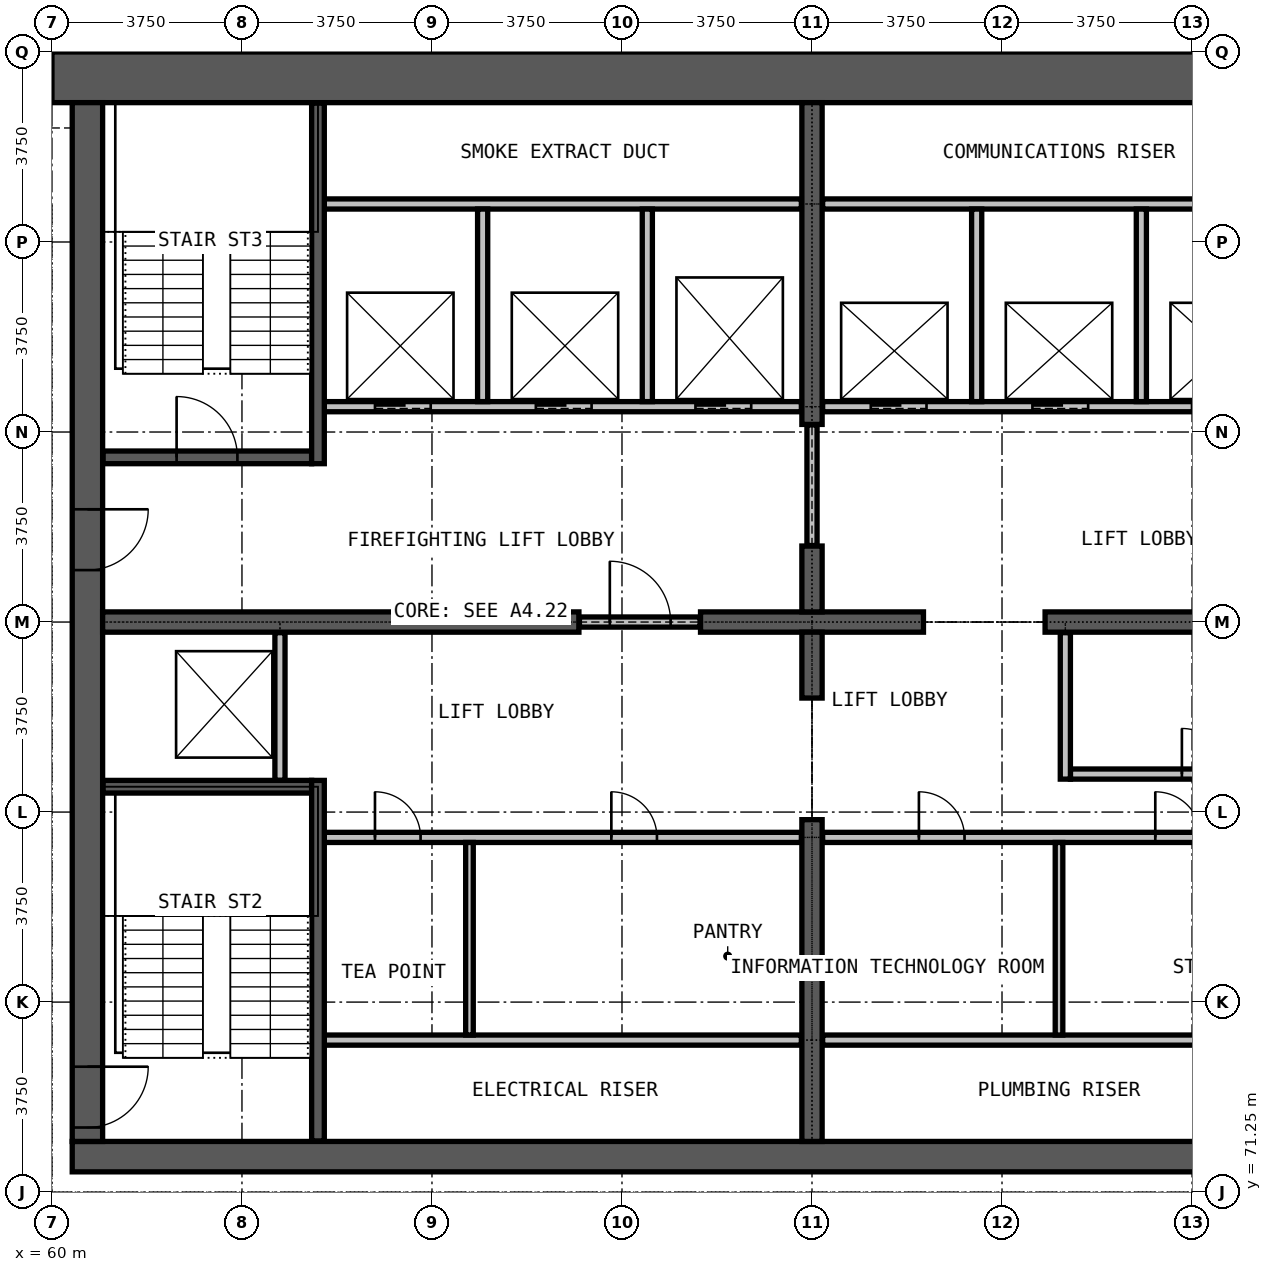
"""IFC4 building model, lengths in metres.
Left out: names, types, materials, properties, quantities, classifications, styles, units other than length and angle.
Written with IfcOpenShell. Run it as: python <this file> out.ifc"""

import sys

from ifc_helpers import new_model, si_unit, direction, frame, frame_2d, origin, place, context, subcontext, project, spatial, rectangle, extrude, element, fill, save


model = new_model("IFC4")
c1 = context("Model", 3, precision=1e-05, world=origin(), true_north=direction((0.0, 1.0)))
c2 = subcontext(c1, "Body", "Model", "MODEL_VIEW")
j1 = project(units=[si_unit("LENGTHUNIT", "METRE"), si_unit("PLANEANGLEUNIT", "RADIAN")], contexts=[c1])
p1 = place(None, origin())
s1 = spatial("IfcSite", under=j1, at=p1, CompositionType="ELEMENT")
p2 = place(p1, origin())
s2 = spatial("IfcBuilding", under=s1, at=p2, CompositionType="ELEMENT")
p3 = place(p2, frame((0.0, 0.0, 199.5)))
s3 = spatial("IfcBuildingStorey", under=s2, at=p3, CompositionType="ELEMENT", Elevation=199.5)
p4 = place(p3, frame((60.4, 71.95, 0.0), z_axis=(0.0, 0.0, 1.0), x_axis=(1.0, 0.0, 0.0)))
e1 = element("IfcWall", 1, at=p4, inside=s3, PredefinedType="SHEAR", context=c2, shape_type="SweptSolid", body=[
    extrude(rectangle(XDim=29.2, YDim=0.6, at=frame_2d((14.6, 0.0))), origin(), (0.0, 0.0, 1.0), 3.6),
])
p5 = place(p3, frame((90.0, 93.25, 0.0), z_axis=(0.0, 0.0, 1.0), x_axis=(-1.0, 0.0, 0.0)))
e2 = element("IfcWall", 2, at=p5, inside=s3, PredefinedType="SHEAR", context=c2, shape_type="SweptSolid", body=[
    extrude(rectangle(XDim=30.0, YDim=1.0, at=frame_2d((15.0, 0.0))), origin(), (0.0, 0.0, 1.0), 3.6),
])
p6 = place(p3, frame((60.7, 92.75, 0.0), z_axis=(0.0, 0.0, 1.0), x_axis=(0.0, -1.0, 0.0)))
e3 = element("IfcWall", 3, at=p6, inside=s3, PredefinedType="SHEAR", context=c2, shape_type="SweptSolid", body=[
    extrude(rectangle(XDim=20.5, YDim=0.6, at=frame_2d((10.25, 0.0))), origin(), (0.0, 0.0, 1.0), 3.6),
])
p7 = place(p6, frame((19.025, 0.0, 0.0)))
e4 = element("IfcOpeningElement", 4, at=p7, cuts=e3, PredefinedType="OPENING", context=c2, shape_type="SweptSolid", body=[
    extrude(rectangle(XDim=1.2, YDim=2.2, at=frame_2d((0.6, 1.1))), frame((0.0, 0.31, 0.0), z_axis=(0.0, -1.0, 0.0), x_axis=(1.0, 0.0, 0.0)), (0.0, 0.0, 1.0), 0.62),
])
p8 = place(p6, frame((8.025, 0.0, 0.0)))
e5 = element("IfcOpeningElement", 5, at=p8, cuts=e3, PredefinedType="OPENING", context=c2, shape_type="SweptSolid", body=[
    extrude(rectangle(XDim=1.2, YDim=2.2, at=frame_2d((0.6, 1.1))), frame((0.0, 0.31, 0.0), z_axis=(0.0, -1.0, 0.0), x_axis=(1.0, 0.0, 0.0)), (0.0, 0.0, 1.0), 0.62),
])
p9 = place(p3, frame((61.0, 82.5, 0.0), z_axis=(0.0, 0.0, 1.0), x_axis=(1.0, 0.0, 0.0)))
e6 = element("IfcWall", 6, at=p9, inside=s3, PredefinedType="SHEAR", context=c2, shape_type="SweptSolid", body=[
    extrude(rectangle(XDim=9.4, YDim=0.4, at=frame_2d((4.7, 0.0))), origin(), (0.0, 0.0, 1.0), 3.6),
])
p10 = place(p3, frame((72.8, 82.5, 0.0), z_axis=(0.0, 0.0, 1.0), x_axis=(1.0, 0.0, 0.0)))
e7 = element("IfcWall", 7, at=p10, inside=s3, PredefinedType="SHEAR", context=c2, shape_type="SweptSolid", body=[
    extrude(rectangle(XDim=4.4, YDim=0.4, at=frame_2d((2.2, 0.0))), origin(), (0.0, 0.0, 1.0), 3.6),
])
p11 = place(p3, frame((79.6, 82.5, 0.0), z_axis=(0.0, 0.0, 1.0), x_axis=(1.0, 0.0, 0.0)))
e8 = element("IfcWall", 8, at=p11, inside=s3, PredefinedType="SHEAR", context=c2, shape_type="SweptSolid", body=[
    extrude(rectangle(XDim=9.4, YDim=0.4, at=frame_2d((4.7, 0.0))), origin(), (0.0, 0.0, 1.0), 3.6),
])
p12 = place(p3, frame((75.0, 72.25, 0.0), z_axis=(0.0, 0.0, 1.0), x_axis=(0.0, 1.0, 0.0)))
e9 = element("IfcWall", 9, at=p12, inside=s3, PredefinedType="SHEAR", context=c2, shape_type="SweptSolid", body=[
    extrude(rectangle(XDim=6.35, YDim=0.4, at=frame_2d((3.175, 0.0))), origin(), (0.0, 0.0, 1.0), 3.6),
])
for number, where, z_axis, x_axis in (
    (10, (75.0, 81.0, 0.0), (0.0, 0.0, 1.0), (0.0, 1.0, 0.0)),
    (11, (75.0, 82.7, 0.0), (0.0, 0.0, 1.0), (0.0, 1.0, 0.0)),
):
    element("IfcWall", number, at=place(p3, frame(where, z_axis=z_axis, x_axis=x_axis)), inside=s3, PredefinedType="SHEAR", context=c2, shape_type="SweptSolid", body=[
        extrude(rectangle(XDim=1.3, YDim=0.4, at=frame_2d((0.65, 0.0))), origin(), (0.0, 0.0, 1.0), 3.6),
    ])
p13 = place(p3, frame((75.0, 86.4, 0.0), z_axis=(0.0, 0.0, 1.0), x_axis=(0.0, 1.0, 0.0)))
e12 = element("IfcWall", 12, at=p13, inside=s3, PredefinedType="SHEAR", context=c2, shape_type="SweptSolid", body=[
    extrude(rectangle(XDim=6.35, YDim=0.4, at=frame_2d((3.175, 0.0))), origin(), (0.0, 0.0, 1.0), 3.6),
])
for number, where, z_axis, x_axis in (
    (13, (65.375, 74.25, 0.0), (0.0, 0.0, 1.0), (1.0, 0.0, 0.0)),
    (14, (75.21, 74.25, 0.0), (0.0, 0.0, 1.0), (1.0, 0.0, 0.0)),
):
    element("IfcWall", number, at=place(p3, frame(where, z_axis=z_axis, x_axis=x_axis)), inside=s3, PredefinedType="PARTITIONING", context=c2, shape_type="SweptSolid", body=[
        extrude(rectangle(XDim=9.415, YDim=0.2, at=frame_2d((4.708, 0.0))), origin(), (0.0, 0.0, 1.0), 3.3),
    ])
p14 = place(p3, frame((65.375, 78.25, 0.0), z_axis=(0.0, 0.0, 1.0), x_axis=(1.0, 0.0, 0.0)))
e15 = element("IfcWall", 15, at=p14, inside=s3, PredefinedType="PARTITIONING", context=c2, shape_type="SweptSolid", body=[
    extrude(rectangle(XDim=9.415, YDim=0.2, at=frame_2d((4.708, 0.0))), origin(), (0.0, 0.0, 1.0), 3.3),
])
p15 = place(p14, frame((1.0, 0.0, 0.0)))
e16 = element("IfcOpeningElement", 16, at=p15, cuts=e15, PredefinedType="OPENING", context=c2, shape_type="SweptSolid", body=[
    extrude(rectangle(XDim=0.9, YDim=2.2, at=frame_2d((0.45, 1.1))), frame((0.0, 0.11, 0.0), z_axis=(0.0, -1.0, 0.0), x_axis=(1.0, 0.0, 0.0)), (0.0, 0.0, 1.0), 0.22),
])
p16 = place(p14, frame((5.665, 0.0, 0.0)))
e17 = element("IfcOpeningElement", 17, at=p16, cuts=e15, PredefinedType="OPENING", context=c2, shape_type="SweptSolid", body=[
    extrude(rectangle(XDim=0.9, YDim=2.2, at=frame_2d((0.45, 1.1))), frame((0.0, 0.11, 0.0), z_axis=(0.0, -1.0, 0.0), x_axis=(1.0, 0.0, 0.0)), (0.0, 0.0, 1.0), 0.22),
])
p17 = place(p3, frame((75.21, 78.25, 0.0), z_axis=(0.0, 0.0, 1.0), x_axis=(1.0, 0.0, 0.0)))
e18 = element("IfcWall", 18, at=p17, inside=s3, PredefinedType="PARTITIONING", context=c2, shape_type="SweptSolid", body=[
    extrude(rectangle(XDim=9.415, YDim=0.2, at=frame_2d((4.708, 0.0))), origin(), (0.0, 0.0, 1.0), 3.3),
])
p18 = place(p17, frame((1.9, 0.0, 0.0)))
e19 = element("IfcOpeningElement", 19, at=p18, cuts=e18, PredefinedType="OPENING", context=c2, shape_type="SweptSolid", body=[
    extrude(rectangle(XDim=0.9, YDim=2.2, at=frame_2d((0.45, 1.1))), frame((0.0, 0.11, 0.0), z_axis=(0.0, -1.0, 0.0), x_axis=(1.0, 0.0, 0.0)), (0.0, 0.0, 1.0), 0.22),
])
p19 = place(p17, frame((6.565, 0.0, 0.0)))
e20 = element("IfcOpeningElement", 20, at=p19, cuts=e18, PredefinedType="OPENING", context=c2, shape_type="SweptSolid", body=[
    extrude(rectangle(XDim=0.9, YDim=2.2, at=frame_2d((0.45, 1.1))), frame((0.0, 0.11, 0.0), z_axis=(0.0, -1.0, 0.0), x_axis=(1.0, 0.0, 0.0)), (0.0, 0.0, 1.0), 0.22),
])
p20 = place(p3, frame((80.1, 79.5, 0.0), z_axis=(0.0, 0.0, 1.0), x_axis=(1.0, 0.0, 0.0)))
e21 = element("IfcWall", 21, at=p20, inside=s3, PredefinedType="PARTITIONING", context=c2, shape_type="SweptSolid", body=[
    extrude(rectangle(XDim=5.3, YDim=0.2, at=frame_2d((2.65, 0.0))), origin(), (0.0, 0.0, 1.0), 3.3),
])
p21 = place(p20, frame((2.2, 0.0, 0.0)))
e22 = element("IfcOpeningElement", 22, at=p21, cuts=e21, PredefinedType="OPENING", context=c2, shape_type="SweptSolid", body=[
    extrude(rectangle(XDim=0.9, YDim=2.2, at=frame_2d((0.45, 1.1))), frame((0.0, 0.11, 0.0), z_axis=(0.0, -1.0, 0.0), x_axis=(1.0, 0.0, 0.0)), (0.0, 0.0, 1.0), 0.22),
])
p22 = place(p3, frame((70.41, 82.5, 0.0), z_axis=(0.0, 0.0, 1.0), x_axis=(1.0, 0.0, 0.0)))
e23 = element("IfcWall", 23, at=p22, inside=s3, PredefinedType="PARTITIONING", context=c2, shape_type="SweptSolid", body=[
    extrude(rectangle(XDim=2.38, YDim=0.2, at=frame_2d((1.19, 0.0))), origin(), (0.0, 0.0, 1.0), 2.4),
])
p23 = place(p22, frame((0.6, 0.0, 0.0)))
e24 = element("IfcOpeningElement", 24, at=p23, cuts=e23, PredefinedType="OPENING", context=c2, shape_type="SweptSolid", body=[
    extrude(rectangle(XDim=1.2, YDim=2.2, at=frame_2d((0.6, 1.1))), frame((0.0, 0.11, 0.0), z_axis=(0.0, -1.0, 0.0), x_axis=(1.0, 0.0, 0.0)), (0.0, 0.0, 1.0), 0.22),
])
p24 = place(p3, frame((75.0, 84.01, 0.0), z_axis=(0.0, 0.0, 1.0), x_axis=(0.0, 1.0, 0.0)))
e25 = element("IfcWall", 25, at=p24, inside=s3, PredefinedType="PARTITIONING", context=c2, shape_type="SweptSolid", body=[
    extrude(rectangle(XDim=2.38, YDim=0.2, at=frame_2d((1.19, 0.0))), origin(), (0.0, 0.0, 1.0), 2.4),
])
p25 = place(p3, frame((80.0, 79.4, 0.0), z_axis=(0.0, 0.0, 1.0), x_axis=(0.0, 1.0, 0.0)))
e26 = element("IfcWall", 26, at=p25, inside=s3, PredefinedType="PARTITIONING", context=c2, shape_type="SweptSolid", body=[
    extrude(rectangle(XDim=2.89, YDim=0.2, at=frame_2d((1.445, 0.0))), origin(), (0.0, 0.0, 1.0), 3.3),
])
for number, where, z_axis, x_axis in (
    (27, (68.24, 74.35, 0.0), (0.0, 0.0, 1.0), (0.0, 1.0, 0.0)),
    (28, (79.875, 74.35, 0.0), (0.0, 0.0, 1.0), (0.0, 1.0, 0.0)),
):
    element("IfcWall", number, at=place(p3, frame(where, z_axis=z_axis, x_axis=x_axis)), inside=s3, PredefinedType="PARTITIONING", context=c2, shape_type="SweptSolid", body=[
        extrude(rectangle(XDim=3.8, YDim=0.15, at=frame_2d((1.9, 0.0))), origin(), (0.0, 0.0, 1.0), 3.3),
    ])
p26 = place(p3, frame((65.375, 86.75, 0.0), z_axis=(0.0, 0.0, 1.0), x_axis=(1.0, 0.0, 0.0)))
e29 = element("IfcWall", 29, at=p26, inside=s3, PredefinedType="PARTITIONING", context=c2, shape_type="SweptSolid", body=[
    extrude(rectangle(XDim=9.415, YDim=0.2, at=frame_2d((4.708, 0.0))), origin(), (0.0, 0.0, 1.0), 3.3),
])
p27 = place(p26, frame((1.0, 0.0, 0.0)))
e30 = element("IfcOpeningElement", 30, at=p27, cuts=e29, PredefinedType="OPENING", context=c2, shape_type="SweptSolid", body=[
    extrude(rectangle(XDim=1.1, YDim=2.2, at=frame_2d((0.55, 1.1))), frame((0.0, 0.11, 0.0), z_axis=(0.0, -1.0, 0.0), x_axis=(1.0, 0.0, 0.0)), (0.0, 0.0, 1.0), 0.22),
])
p28 = place(p26, frame((4.175, 0.0, 0.0)))
e31 = element("IfcOpeningElement", 31, at=p28, cuts=e29, PredefinedType="OPENING", context=c2, shape_type="SweptSolid", body=[
    extrude(rectangle(XDim=1.1, YDim=2.2, at=frame_2d((0.55, 1.1))), frame((0.0, 0.11, 0.0), z_axis=(0.0, -1.0, 0.0), x_axis=(1.0, 0.0, 0.0)), (0.0, 0.0, 1.0), 0.22),
])
p29 = place(p26, frame((7.325, 0.0, 0.0)))
e32 = element("IfcOpeningElement", 32, at=p29, cuts=e29, PredefinedType="OPENING", context=c2, shape_type="SweptSolid", body=[
    extrude(rectangle(XDim=1.1, YDim=2.2, at=frame_2d((0.55, 1.1))), frame((0.0, 0.11, 0.0), z_axis=(0.0, -1.0, 0.0), x_axis=(1.0, 0.0, 0.0)), (0.0, 0.0, 1.0), 0.22),
])
p30 = place(p3, frame((75.21, 86.75, 0.0), z_axis=(0.0, 0.0, 1.0), x_axis=(1.0, 0.0, 0.0)))
e33 = element("IfcWall", 33, at=p30, inside=s3, PredefinedType="PARTITIONING", context=c2, shape_type="SweptSolid", body=[
    extrude(rectangle(XDim=9.415, YDim=0.2, at=frame_2d((4.708, 0.0))), origin(), (0.0, 0.0, 1.0), 3.3),
])
p31 = place(p30, frame((0.95, 0.0, 0.0)))
e34 = element("IfcOpeningElement", 34, at=p31, cuts=e33, PredefinedType="OPENING", context=c2, shape_type="SweptSolid", body=[
    extrude(rectangle(XDim=1.1, YDim=2.2, at=frame_2d((0.55, 1.1))), frame((0.0, 0.11, 0.0), z_axis=(0.0, -1.0, 0.0), x_axis=(1.0, 0.0, 0.0)), (0.0, 0.0, 1.0), 0.22),
])
p32 = place(p30, frame((4.14, 0.0, 0.0)))
e35 = element("IfcOpeningElement", 35, at=p32, cuts=e33, PredefinedType="OPENING", context=c2, shape_type="SweptSolid", body=[
    extrude(rectangle(XDim=1.1, YDim=2.2, at=frame_2d((0.55, 1.1))), frame((0.0, 0.11, 0.0), z_axis=(0.0, -1.0, 0.0), x_axis=(1.0, 0.0, 0.0)), (0.0, 0.0, 1.0), 0.22),
])
p33 = place(p30, frame((7.29, 0.0, 0.0)))
e36 = element("IfcOpeningElement", 36, at=p33, cuts=e33, PredefinedType="OPENING", context=c2, shape_type="SweptSolid", body=[
    extrude(rectangle(XDim=1.1, YDim=2.2, at=frame_2d((0.55, 1.1))), frame((0.0, 0.11, 0.0), z_axis=(0.0, -1.0, 0.0), x_axis=(1.0, 0.0, 0.0)), (0.0, 0.0, 1.0), 0.22),
])
for number, where, z_axis, x_axis in (
    (37, (65.375, 90.75, 0.0), (0.0, 0.0, 1.0), (1.0, 0.0, 0.0)),
    (38, (75.21, 90.75, 0.0), (0.0, 0.0, 1.0), (1.0, 0.0, 0.0)),
):
    element("IfcWall", number, at=place(p3, frame(where, z_axis=z_axis, x_axis=x_axis)), inside=s3, PredefinedType="PARTITIONING", context=c2, shape_type="SweptSolid", body=[
        extrude(rectangle(XDim=9.415, YDim=0.2, at=frame_2d((4.708, 0.0))), origin(), (0.0, 0.0, 1.0), 3.3),
    ])
p34 = place(p3, frame((64.5, 79.375, 0.0), z_axis=(0.0, 0.0, 1.0), x_axis=(0.0, 1.0, 0.0)))
e39 = element("IfcWall", 39, at=p34, inside=s3, PredefinedType="PARTITIONING", context=c2, shape_type="SweptSolid", body=[
    extrude(rectangle(XDim=2.915, YDim=0.2, at=frame_2d((1.458, 0.0))), origin(), (0.0, 0.0, 1.0), 3.3),
])
for number, where, z_axis, x_axis in (
    (40, (68.5, 86.85, 0.0), (0.0, 0.0, 1.0), (0.0, 1.0, 0.0)),
    (41, (71.75, 86.85, 0.0), (0.0, 0.0, 1.0), (0.0, 1.0, 0.0)),
    (42, (78.25, 86.85, 0.0), (0.0, 0.0, 1.0), (0.0, 1.0, 0.0)),
    (43, (81.5, 86.85, 0.0), (0.0, 0.0, 1.0), (0.0, 1.0, 0.0)),
):
    element("IfcWall", number, at=place(p3, frame(where, z_axis=z_axis, x_axis=x_axis)), inside=s3, PredefinedType="PARTITIONING", context=c2, shape_type="SweptSolid", body=[
        extrude(rectangle(XDim=3.8, YDim=0.2, at=frame_2d((1.9, 0.0))), origin(), (0.0, 0.0, 1.0), 3.3),
    ])
p35 = place(p3, frame((61.01, 79.25, 0.0), z_axis=(0.0, 0.0, 1.0), x_axis=(1.0, 0.0, 0.0)))
e44 = element("IfcWall", 44, at=p35, inside=s3, PredefinedType="PARTITIONING", context=c2, shape_type="SweptSolid", body=[
    extrude(rectangle(XDim=4.115, YDim=0.25, at=frame_2d((2.058, 0.0))), origin(), (0.0, 0.0, 1.0), 3.3),
])
p36 = place(p3, frame((61.01, 85.75, 0.0), z_axis=(0.0, 0.0, 1.0), x_axis=(1.0, 0.0, 0.0)))
e45 = element("IfcWall", 45, at=p36, inside=s3, PredefinedType="PARTITIONING", context=c2, shape_type="SweptSolid", body=[
    extrude(rectangle(XDim=4.115, YDim=0.25, at=frame_2d((2.058, 0.0))), origin(), (0.0, 0.0, 1.0), 3.3),
])
p37 = place(p36, frame((1.45, 0.0, 0.0)))
e46 = element("IfcOpeningElement", 46, at=p37, cuts=e45, PredefinedType="OPENING", context=c2, shape_type="SweptSolid", body=[
    extrude(rectangle(XDim=1.2, YDim=2.2, at=frame_2d((0.6, 1.1))), frame((0.0, 0.135, 0.0), z_axis=(0.0, -1.0, 0.0), x_axis=(1.0, 0.0, 0.0)), (0.0, 0.0, 1.0), 0.27),
])
for number, where, z_axis, x_axis in (
    (47, (65.25, 72.26, 0.0), (0.0, 0.0, 1.0), (0.0, 1.0, 0.0)),
    (48, (65.25, 85.625, 0.0), (0.0, 0.0, 1.0), (0.0, 1.0, 0.0)),
):
    element("IfcWall", number, at=place(p3, frame(where, z_axis=z_axis, x_axis=x_axis)), inside=s3, PredefinedType="PARTITIONING", context=c2, shape_type="SweptSolid", body=[
        extrude(rectangle(XDim=7.115, YDim=0.25, at=frame_2d((3.558, 0.0))), origin(), (0.0, 0.0, 1.0), 3.3),
    ])
p38 = place(p31, origin())
e49 = element("IfcDoor", 49, at=p38, inside=s3, OperationType="DOUBLE_DOOR_SLIDING", PredefinedType="DOOR", context=c2, shape_type="SweptSolid", body=[
    extrude(rectangle(XDim=1.1, YDim=2.2, at=frame_2d((0.55, 1.1))), frame((0.0, 0.025, 0.0), z_axis=(0.0, -1.0, 0.0), x_axis=(1.0, 0.0, 0.0)), (0.0, 0.0, 1.0), 0.05),
])
fill(e34, e49)
p39 = place(p32, origin())
e50 = element("IfcDoor", 50, at=p39, inside=s3, OperationType="DOUBLE_DOOR_SLIDING", PredefinedType="DOOR", context=c2, shape_type="SweptSolid", body=[
    extrude(rectangle(XDim=1.1, YDim=2.2, at=frame_2d((0.55, 1.1))), frame((0.0, 0.025, 0.0), z_axis=(0.0, -1.0, 0.0), x_axis=(1.0, 0.0, 0.0)), (0.0, 0.0, 1.0), 0.05),
])
fill(e35, e50)
p40 = place(p27, origin())
e51 = element("IfcDoor", 51, at=p40, inside=s3, OperationType="DOUBLE_DOOR_SLIDING", PredefinedType="DOOR", context=c2, shape_type="SweptSolid", body=[
    extrude(rectangle(XDim=1.1, YDim=2.2, at=frame_2d((0.55, 1.1))), frame((0.0, 0.025, 0.0), z_axis=(0.0, -1.0, 0.0), x_axis=(1.0, 0.0, 0.0)), (0.0, 0.0, 1.0), 0.05),
])
fill(e30, e51)
p41 = place(p28, origin())
e52 = element("IfcDoor", 52, at=p41, inside=s3, OperationType="DOUBLE_DOOR_SLIDING", PredefinedType="DOOR", context=c2, shape_type="SweptSolid", body=[
    extrude(rectangle(XDim=1.1, YDim=2.2, at=frame_2d((0.55, 1.1))), frame((0.0, 0.025, 0.0), z_axis=(0.0, -1.0, 0.0), x_axis=(1.0, 0.0, 0.0)), (0.0, 0.0, 1.0), 0.05),
])
fill(e31, e52)
p42 = place(p29, origin())
e53 = element("IfcDoor", 53, at=p42, inside=s3, OperationType="DOUBLE_DOOR_SLIDING", PredefinedType="DOOR", context=c2, shape_type="SweptSolid", body=[
    extrude(rectangle(XDim=1.1, YDim=2.2, at=frame_2d((0.55, 1.1))), frame((0.0, 0.025, 0.0), z_axis=(0.0, -1.0, 0.0), x_axis=(1.0, 0.0, 0.0)), (0.0, 0.0, 1.0), 0.05),
])
fill(e32, e53)
p43 = place(p23, origin())
e54 = element("IfcDoor", 54, at=p43, inside=s3, OperationType="SINGLE_SWING_LEFT", PredefinedType="DOOR", context=c2, shape_type="SweptSolid", body=[
    extrude(rectangle(XDim=1.2, YDim=2.2, at=frame_2d((0.6, 1.1))), frame((0.0, 0.025, 0.0), z_axis=(0.0, -1.0, 0.0), x_axis=(1.0, 0.0, 0.0)), (0.0, 0.0, 1.0), 0.05),
])
fill(e24, e54)
p44 = place(p37, origin())
e55 = element("IfcDoor", 55, at=p44, inside=s3, OperationType="SINGLE_SWING_LEFT", PredefinedType="DOOR", context=c2, shape_type="SweptSolid", body=[
    extrude(rectangle(XDim=1.2, YDim=2.2, at=frame_2d((0.6, 1.1))), frame((0.0, 0.025, 0.0), z_axis=(0.0, -1.0, 0.0), x_axis=(1.0, 0.0, 0.0)), (0.0, 0.0, 1.0), 0.05),
])
fill(e46, e55)
p45 = place(p7, origin())
e56 = element("IfcDoor", 56, at=p45, inside=s3, OperationType="SINGLE_SWING_LEFT", PredefinedType="DOOR", context=c2, shape_type="SweptSolid", body=[
    extrude(rectangle(XDim=1.2, YDim=2.2, at=frame_2d((0.6, 1.1))), frame((0.0, 0.025, 0.0), z_axis=(0.0, -1.0, 0.0), x_axis=(1.0, 0.0, 0.0)), (0.0, 0.0, 1.0), 0.05),
])
fill(e4, e56)
p46 = place(p21, origin())
e57 = element("IfcDoor", 57, at=p46, inside=s3, OperationType="SINGLE_SWING_LEFT", PredefinedType="DOOR", context=c2, shape_type="SweptSolid", body=[
    extrude(rectangle(XDim=0.9, YDim=2.2, at=frame_2d((0.45, 1.1))), frame((0.0, 0.025, 0.0), z_axis=(0.0, -1.0, 0.0), x_axis=(1.0, 0.0, 0.0)), (0.0, 0.0, 1.0), 0.05),
])
fill(e22, e57)
p47 = place(p8, origin())
e58 = element("IfcDoor", 58, at=p47, inside=s3, OperationType="SINGLE_SWING_LEFT", PredefinedType="DOOR", context=c2, shape_type="SweptSolid", body=[
    extrude(rectangle(XDim=1.2, YDim=2.2, at=frame_2d((0.6, 1.1))), frame((0.0, 0.025, 0.0), z_axis=(0.0, -1.0, 0.0), x_axis=(1.0, 0.0, 0.0)), (0.0, 0.0, 1.0), 0.05),
])
fill(e5, e58)
p48 = place(p15, origin())
e59 = element("IfcDoor", 59, at=p48, inside=s3, OperationType="SINGLE_SWING_LEFT", PredefinedType="DOOR", context=c2, shape_type="SweptSolid", body=[
    extrude(rectangle(XDim=0.9, YDim=2.2, at=frame_2d((0.45, 1.1))), frame((0.0, 0.025, 0.0), z_axis=(0.0, -1.0, 0.0), x_axis=(1.0, 0.0, 0.0)), (0.0, 0.0, 1.0), 0.05),
])
fill(e16, e59)
p49 = place(p16, origin())
e60 = element("IfcDoor", 60, at=p49, inside=s3, OperationType="SINGLE_SWING_LEFT", PredefinedType="DOOR", context=c2, shape_type="SweptSolid", body=[
    extrude(rectangle(XDim=0.9, YDim=2.2, at=frame_2d((0.45, 1.1))), frame((0.0, 0.025, 0.0), z_axis=(0.0, -1.0, 0.0), x_axis=(1.0, 0.0, 0.0)), (0.0, 0.0, 1.0), 0.05),
])
fill(e17, e60)
p50 = place(p18, origin())
e61 = element("IfcDoor", 61, at=p50, inside=s3, OperationType="SINGLE_SWING_RIGHT", PredefinedType="DOOR", context=c2, shape_type="SweptSolid", body=[
    extrude(rectangle(XDim=0.9, YDim=2.2, at=frame_2d((0.45, 1.1))), frame((0.0, 0.025, 0.0), z_axis=(0.0, -1.0, 0.0), x_axis=(1.0, 0.0, 0.0)), (0.0, 0.0, 1.0), 0.05),
])
fill(e19, e61)
p51 = place(p19, origin())
e62 = element("IfcDoor", 62, at=p51, inside=s3, OperationType="SINGLE_SWING_LEFT", PredefinedType="DOOR", context=c2, shape_type="SweptSolid", body=[
    extrude(rectangle(XDim=0.9, YDim=2.2, at=frame_2d((0.45, 1.1))), frame((0.0, 0.025, 0.0), z_axis=(0.0, -1.0, 0.0), x_axis=(1.0, 0.0, 0.0)), (0.0, 0.0, 1.0), 0.05),
])
fill(e20, e62)
save(model, sys.argv[1])
